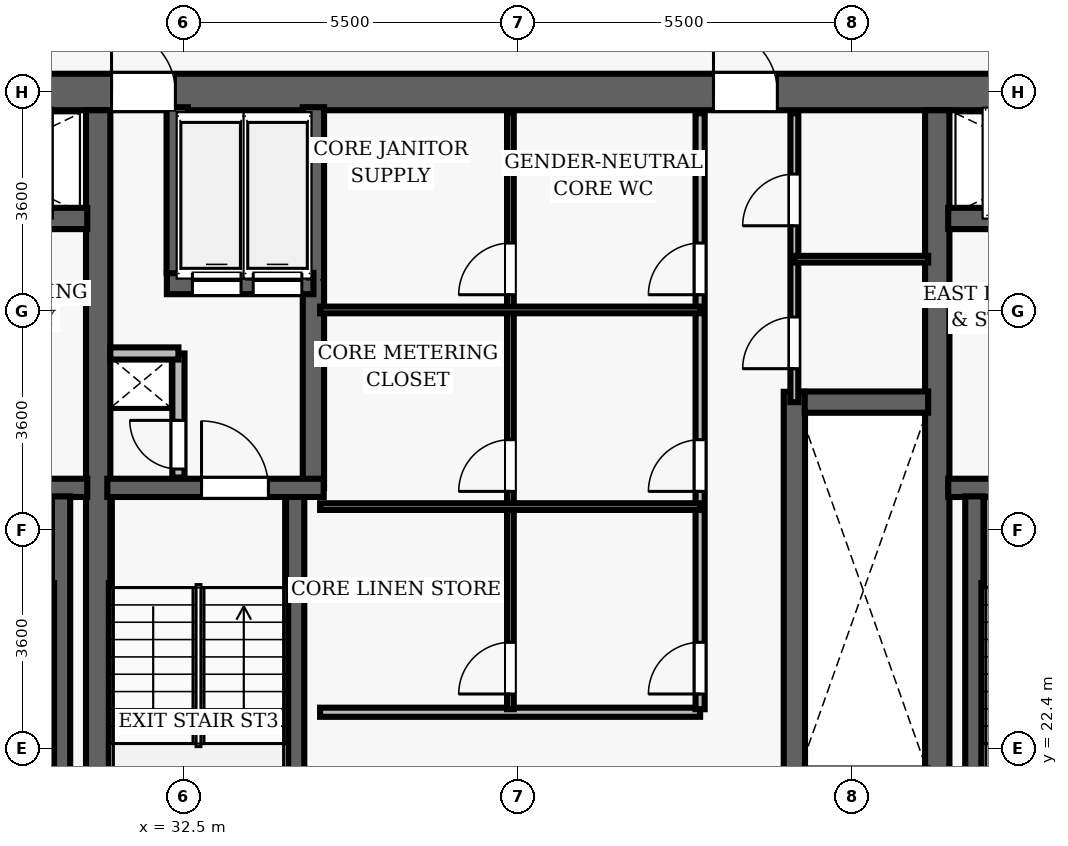
"""IFC4 building model, lengths in metres.
Left out: names, types, materials, properties, quantities, classifications, styles, units other than length and angle.
Written with IfcOpenShell. Run it as: python <this file> out.ifc"""

import sys

from ifc_helpers import new_model, si_unit, direction, frame, frame_2d, origin, place, context, subcontext, project, spatial, rectangle, extrude, element, fill, save


model = new_model("IFC4")
c1 = context("Model", 3, precision=1e-05, world=origin(), true_north=direction((0.0, 1.0)))
c2 = subcontext(c1, "Body", "Model", "MODEL_VIEW")
j1 = project(units=[si_unit("LENGTHUNIT", "METRE"), si_unit("PLANEANGLEUNIT", "RADIAN")], contexts=[c1])
p1 = place(None, origin())
s1 = spatial("IfcSite", under=j1, at=p1, CompositionType="ELEMENT")
p2 = place(p1, origin())
s2 = spatial("IfcBuilding", under=s1, at=p2, CompositionType="ELEMENT")
p3 = place(p2, frame((0.0, 0.0, 113.3)))
s3 = spatial("IfcBuildingStorey", under=s2, at=p3, CompositionType="ELEMENT", Elevation=113.3)
p4 = place(p3, frame((26.7, 33.2, 0.0), z_axis=(0.0, 0.0, 1.0), x_axis=(1.0, 0.0, 0.0)))
e1 = element("IfcWall", 1, at=p4, inside=s3, PredefinedType="SHEAR", context=c2, shape_type="SweptSolid", body=[
    extrude(rectangle(XDim=22.6, YDim=0.6, at=frame_2d((11.3, 0.0))), origin(), (0.0, 0.0, 1.0), 3.5),
])
p5 = place(p4, frame((4.62, 0.0, 0.0)))
e2 = element("IfcOpeningElement", 2, at=p5, cuts=e1, PredefinedType="OPENING", context=c2, shape_type="SweptSolid", body=[
    extrude(rectangle(XDim=1.05, YDim=2.15, at=frame_2d((0.525, 1.075))), frame((0.0, 0.31, 0.0), z_axis=(0.0, -1.0, 0.0), x_axis=(1.0, 0.0, 0.0)), (0.0, 0.0, 1.0), 0.62),
])
p6 = place(p4, frame((14.52, 0.0, 0.0)))
e3 = element("IfcOpeningElement", 3, at=p6, cuts=e1, PredefinedType="OPENING", context=c2, shape_type="SweptSolid", body=[
    extrude(rectangle(XDim=1.05, YDim=2.15, at=frame_2d((0.525, 1.075))), frame((0.0, 0.31, 0.0), z_axis=(0.0, -1.0, 0.0), x_axis=(1.0, 0.0, 0.0)), (0.0, 0.0, 1.0), 0.62),
])
for number, where, z_axis, x_axis in (
    (4, (31.1, 19.1, 0.0), (0.0, 0.0, 1.0), (0.0, 1.0, 0.0)),
    (5, (44.9, 19.1, 0.0), (0.0, 0.0, 1.0), (0.0, 1.0, 0.0)),
):
    element("IfcWall", number, at=place(p3, frame(where, z_axis=z_axis, x_axis=x_axis)), inside=s3, PredefinedType="SHEAR", context=c2, shape_type="SweptSolid", body=[
        extrude(rectangle(XDim=13.8, YDim=0.4, at=frame_2d((6.9, 0.0))), origin(), (0.0, 0.0, 1.0), 3.5),
    ])
p7 = place(p3, frame((27.25, 26.69, 0.0), z_axis=(0.0, 0.0, 1.0), x_axis=(1.0, 0.0, 0.0)))
e6 = element("IfcWall", 6, at=p7, inside=s3, PredefinedType="SHEAR", context=c2, shape_type="SweptSolid", body=[
    extrude(rectangle(XDim=3.67, YDim=0.3, at=frame_2d((1.835, 0.0))), origin(), (0.0, 0.0, 1.0), 3.5),
])
p8 = place(p7, frame((1.05, 0.0, 0.0)))
e7 = element("IfcOpeningElement", 7, at=p8, cuts=e6, PredefinedType="OPENING", context=c2, shape_type="SweptSolid", body=[
    extrude(rectangle(XDim=1.1, YDim=2.15, at=frame_2d((0.55, 1.075))), frame((0.0, 0.16, 0.0), z_axis=(0.0, -1.0, 0.0), x_axis=(1.0, 0.0, 0.0)), (0.0, 0.0, 1.0), 0.32),
])
p9 = place(p3, frame((30.49, 19.05, 0.0), z_axis=(0.0, 0.0, 1.0), x_axis=(0.0, 1.0, 0.0)))
e8 = element("IfcWall", 8, at=p9, inside=s3, PredefinedType="SHEAR", context=c2, shape_type="SweptSolid", body=[
    extrude(rectangle(XDim=7.5, YDim=0.3, at=frame_2d((3.75, 0.0))), origin(), (0.0, 0.0, 1.0), 3.5),
])
p10 = place(p3, frame((27.25, 31.12, 0.0), z_axis=(0.0, 0.0, 1.0), x_axis=(1.0, 0.0, 0.0)))
e9 = element("IfcWall", 9, at=p10, inside=s3, PredefinedType="SHEAR", context=c2, shape_type="SweptSolid", body=[
    extrude(rectangle(XDim=3.67, YDim=0.35, at=frame_2d((1.835, 0.0))), origin(), (0.0, 0.0, 1.0), 2.675),
])
p11 = place(p10, frame((1.25, 0.0, 0.0)))
e10 = element("IfcOpeningElement", 10, at=p11, cuts=e9, PredefinedType="OPENING", context=c2, shape_type="SweptSolid", body=[
    extrude(rectangle(XDim=1.1, YDim=2.15, at=frame_2d((0.55, 1.075))), frame((0.0, 0.185, 0.0), z_axis=(0.0, -1.0, 0.0), x_axis=(1.0, 0.0, 0.0)), (0.0, 0.0, 1.0), 0.37),
])
p12 = place(p3, frame((45.08, 26.69, 0.0), z_axis=(0.0, 0.0, 1.0), x_axis=(1.0, 0.0, 0.0)))
e11 = element("IfcWall", 11, at=p12, inside=s3, PredefinedType="SHEAR", context=c2, shape_type="SweptSolid", body=[
    extrude(rectangle(XDim=3.67, YDim=0.3, at=frame_2d((1.835, 0.0))), origin(), (0.0, 0.0, 1.0), 3.5),
])
p13 = place(p12, frame((1.05, 0.0, 0.0)))
e12 = element("IfcOpeningElement", 12, at=p13, cuts=e11, PredefinedType="OPENING", context=c2, shape_type="SweptSolid", body=[
    extrude(rectangle(XDim=1.1, YDim=2.15, at=frame_2d((0.55, 1.075))), frame((0.0, 0.16, 0.0), z_axis=(0.0, -1.0, 0.0), x_axis=(1.0, 0.0, 0.0)), (0.0, 0.0, 1.0), 0.32),
])
p14 = place(p3, frame((45.51, 19.05, 0.0), z_axis=(0.0, 0.0, 1.0), x_axis=(0.0, 1.0, 0.0)))
e13 = element("IfcWall", 13, at=p14, inside=s3, PredefinedType="SHEAR", context=c2, shape_type="SweptSolid", body=[
    extrude(rectangle(XDim=7.5, YDim=0.3, at=frame_2d((3.75, 0.0))), origin(), (0.0, 0.0, 1.0), 3.5),
])
p15 = place(p3, frame((45.08, 31.12, 0.0), z_axis=(0.0, 0.0, 1.0), x_axis=(1.0, 0.0, 0.0)))
e14 = element("IfcWall", 14, at=p15, inside=s3, PredefinedType="SHEAR", context=c2, shape_type="SweptSolid", body=[
    extrude(rectangle(XDim=3.67, YDim=0.35, at=frame_2d((1.835, 0.0))), origin(), (0.0, 0.0, 1.0), 2.675),
])
p16 = place(p15, frame((1.25, 0.0, 0.0)))
e15 = element("IfcOpeningElement", 15, at=p16, cuts=e14, PredefinedType="OPENING", context=c2, shape_type="SweptSolid", body=[
    extrude(rectangle(XDim=1.1, YDim=2.15, at=frame_2d((0.55, 1.075))), frame((0.0, 0.185, 0.0), z_axis=(0.0, -1.0, 0.0), x_axis=(1.0, 0.0, 0.0)), (0.0, 0.0, 1.0), 0.37),
])
p17 = place(p3, frame((34.34, 19.05, 0.0), z_axis=(0.0, 0.0, 1.0), x_axis=(0.0, 1.0, 0.0)))
e16 = element("IfcWall", 16, at=p17, inside=s3, PredefinedType="SHEAR", context=c2, shape_type="SweptSolid", body=[
    extrude(rectangle(XDim=7.5, YDim=0.3, at=frame_2d((3.75, 0.0))), origin(), (0.0, 0.0, 1.0), 3.5),
])
p18 = place(p3, frame((34.64, 26.69, 0.0), z_axis=(0.0, 0.0, 1.0), x_axis=(0.0, 1.0, 0.0)))
e17 = element("IfcWall", 17, at=p18, inside=s3, PredefinedType="SHEAR", context=c2, shape_type="SweptSolid", body=[
    extrude(rectangle(XDim=6.26, YDim=0.35, at=frame_2d((3.13, 0.0))), origin(), (0.0, 0.0, 1.0), 3.5),
])
p19 = place(p3, frame((31.25, 26.69, 0.0), z_axis=(0.0, 0.0, 1.0), x_axis=(1.0, 0.0, 0.0)))
e18 = element("IfcWall", 18, at=p19, inside=s3, PredefinedType="SHEAR", context=c2, shape_type="SweptSolid", body=[
    extrude(rectangle(XDim=3.56, YDim=0.3, at=frame_2d((1.78, 0.0))), origin(), (0.0, 0.0, 1.0), 3.5),
])
p20 = place(p19, frame((1.55, 0.0, 0.0)))
e19 = element("IfcOpeningElement", 19, at=p20, cuts=e18, PredefinedType="OPENING", context=c2, shape_type="SweptSolid", body=[
    extrude(rectangle(XDim=1.1, YDim=2.15, at=frame_2d((0.55, 1.075))), frame((0.0, 0.16, 0.0), z_axis=(0.0, -1.0, 0.0), x_axis=(1.0, 0.0, 0.0)), (0.0, 0.0, 1.0), 0.32),
])
p21 = place(p3, frame((32.23, 30.05, 0.0), z_axis=(0.0, 0.0, 1.0), x_axis=(1.0, 0.0, 0.0)))
e20 = element("IfcWall", 20, at=p21, inside=s3, PredefinedType="SHEAR", context=c2, shape_type="SweptSolid", body=[
    extrude(rectangle(XDim=2.41, YDim=0.35, at=frame_2d((1.205, 0.0))), origin(), (0.0, 0.0, 1.0), 2.675),
])
p22 = place(p21, frame((0.42, 0.0, 0.0)))
e21 = element("IfcOpeningElement", 21, at=p22, cuts=e20, PredefinedType="OPENING", context=c2, shape_type="SweptSolid", body=[
    extrude(rectangle(XDim=0.8, YDim=2.15, at=frame_2d((0.4, 1.075))), frame((0.0, 0.185, 0.0), z_axis=(0.0, -1.0, 0.0), x_axis=(1.0, 0.0, 0.0)), (0.0, 0.0, 1.0), 0.37),
])
p23 = place(p21, frame((1.42, 0.0, 0.0)))
e22 = element("IfcOpeningElement", 22, at=p23, cuts=e20, PredefinedType="OPENING", context=c2, shape_type="SweptSolid", body=[
    extrude(rectangle(XDim=0.8, YDim=2.15, at=frame_2d((0.4, 1.075))), frame((0.0, 0.185, 0.0), z_axis=(0.0, -1.0, 0.0), x_axis=(1.0, 0.0, 0.0)), (0.0, 0.0, 1.0), 0.37),
])
p24 = place(p3, frame((32.4, 30.22, 0.0), z_axis=(0.0, 0.0, 1.0), x_axis=(0.0, 1.0, 0.0)))
e23 = element("IfcWall", 23, at=p24, inside=s3, PredefinedType="SHEAR", context=c2, shape_type="SweptSolid", body=[
    extrude(rectangle(XDim=2.73, YDim=0.35, at=frame_2d((1.365, 0.0))), origin(), (0.0, 0.0, 1.0), 2.675),
])
p25 = place(p3, frame((32.42, 26.86, 0.0), z_axis=(0.0, 0.0, 1.0), x_axis=(0.0, 1.0, 0.0)))
e24 = element("IfcWall", 24, at=p25, inside=s3, PredefinedType="PARTITIONING", context=c2, shape_type="SweptSolid", body=[
    extrude(rectangle(XDim=2.04, YDim=0.2, at=frame_2d((1.02, 0.0))), origin(), (0.0, 0.0, 1.0), 2.675),
])
p26 = place(p25, frame((0.14, 0.0, 0.0)))
e25 = element("IfcOpeningElement", 25, at=p26, cuts=e24, PredefinedType="OPENING", context=c2, shape_type="SweptSolid", body=[
    extrude(rectangle(XDim=0.8, YDim=2.05, at=frame_2d((0.4, 1.025))), frame((0.0, 0.11, 0.0), z_axis=(0.0, -1.0, 0.0), x_axis=(1.0, 0.0, 0.0)), (0.0, 0.0, 1.0), 0.22),
])
p27 = place(p3, frame((31.3, 28.9, 0.0), z_axis=(0.0, 0.0, 1.0), x_axis=(1.0, 0.0, 0.0)))
e26 = element("IfcWall", 26, at=p27, inside=s3, PredefinedType="PARTITIONING", context=c2, shape_type="SweptSolid", body=[
    extrude(rectangle(XDim=1.12, YDim=0.2, at=frame_2d((0.56, 0.0))), origin(), (0.0, 0.0, 1.0), 2.675),
])
p28 = place(p3, frame((42.55, 21.73, 0.0), z_axis=(0.0, 0.0, 1.0), x_axis=(0.0, 1.0, 0.0)))
e27 = element("IfcWall", 27, at=p28, inside=s3, PredefinedType="SHEAR", context=c2, shape_type="SweptSolid", body=[
    extrude(rectangle(XDim=6.54, YDim=0.35, at=frame_2d((3.27, 0.0))), origin(), (0.0, 0.0, 1.0), 2.675),
])
p29 = place(p3, frame((42.72, 28.1, 0.0), z_axis=(0.0, 0.0, 1.0), x_axis=(1.0, 0.0, 0.0)))
e28 = element("IfcWall", 28, at=p29, inside=s3, PredefinedType="SHEAR", context=c2, shape_type="SweptSolid", body=[
    extrude(rectangle(XDim=2.03, YDim=0.35, at=frame_2d((1.015, 0.0))), origin(), (0.0, 0.0, 1.0), 2.675),
])
p30 = place(p3, frame((34.75, 23.0, 0.0), z_axis=(0.0, 0.0, 1.0), x_axis=(1.0, 0.0, 0.0)))
e29 = element("IfcWall", 29, at=p30, inside=s3, PredefinedType="PARTITIONING", context=c2, shape_type="SweptSolid", body=[
    extrude(rectangle(XDim=6.25, YDim=0.15, at=frame_2d((3.125, 0.0))), origin(), (0.0, 0.0, 1.0), 2.675),
])
p31 = place(p3, frame((41.0, 23.05, 0.0), z_axis=(0.0, 0.0, 1.0), x_axis=(0.0, 1.0, 0.0)))
e30 = element("IfcWall", 30, at=p31, inside=s3, PredefinedType="PARTITIONING", context=c2, shape_type="SweptSolid", body=[
    extrude(rectangle(XDim=9.8, YDim=0.15, at=frame_2d((4.9, 0.0))), origin(), (0.0, 0.0, 1.0), 2.675),
])
p32 = place(p31, frame((0.25, 0.0, 0.0)))
e31 = element("IfcOpeningElement", 31, at=p32, cuts=e30, PredefinedType="OPENING", context=c2, shape_type="SweptSolid", body=[
    extrude(rectangle(XDim=0.85, YDim=2.1, at=frame_2d((0.425, 1.05))), frame((0.0, 0.085, 0.0), z_axis=(0.0, -1.0, 0.0), x_axis=(1.0, 0.0, 0.0)), (0.0, 0.0, 1.0), 0.17),
])
p33 = place(p31, frame((3.582, 0.0, 0.0)))
e32 = element("IfcOpeningElement", 32, at=p33, cuts=e30, PredefinedType="OPENING", context=c2, shape_type="SweptSolid", body=[
    extrude(rectangle(XDim=0.85, YDim=2.1, at=frame_2d((0.425, 1.05))), frame((0.0, 0.085, 0.0), z_axis=(0.0, -1.0, 0.0), x_axis=(1.0, 0.0, 0.0)), (0.0, 0.0, 1.0), 0.17),
])
p34 = place(p31, frame((6.816, 0.0, 0.0)))
e33 = element("IfcOpeningElement", 33, at=p34, cuts=e30, PredefinedType="OPENING", context=c2, shape_type="SweptSolid", body=[
    extrude(rectangle(XDim=0.85, YDim=2.1, at=frame_2d((0.425, 1.05))), frame((0.0, 0.085, 0.0), z_axis=(0.0, -1.0, 0.0), x_axis=(1.0, 0.0, 0.0)), (0.0, 0.0, 1.0), 0.17),
])
p35 = place(p3, frame((37.88, 23.05, 0.0), z_axis=(0.0, 0.0, 1.0), x_axis=(0.0, 1.0, 0.0)))
e34 = element("IfcWall", 34, at=p35, inside=s3, PredefinedType="PARTITIONING", context=c2, shape_type="SweptSolid", body=[
    extrude(rectangle(XDim=9.8, YDim=0.11, at=frame_2d((4.9, 0.0))), origin(), (0.0, 0.0, 1.0), 2.675),
])
p36 = place(p35, frame((0.25, 0.0, 0.0)))
e35 = element("IfcOpeningElement", 35, at=p36, cuts=e34, PredefinedType="OPENING", context=c2, shape_type="SweptSolid", body=[
    extrude(rectangle(XDim=0.85, YDim=2.1, at=frame_2d((0.425, 1.05))), frame((0.0, 0.065, 0.0), z_axis=(0.0, -1.0, 0.0), x_axis=(1.0, 0.0, 0.0)), (0.0, 0.0, 1.0), 0.13),
])
p37 = place(p35, frame((3.582, 0.0, 0.0)))
e36 = element("IfcOpeningElement", 36, at=p37, cuts=e34, PredefinedType="OPENING", context=c2, shape_type="SweptSolid", body=[
    extrude(rectangle(XDim=0.85, YDim=2.1, at=frame_2d((0.425, 1.05))), frame((0.0, 0.065, 0.0), z_axis=(0.0, -1.0, 0.0), x_axis=(1.0, 0.0, 0.0)), (0.0, 0.0, 1.0), 0.13),
])
p38 = place(p35, frame((6.816, 0.0, 0.0)))
e37 = element("IfcOpeningElement", 37, at=p38, cuts=e34, PredefinedType="OPENING", context=c2, shape_type="SweptSolid", body=[
    extrude(rectangle(XDim=0.85, YDim=2.1, at=frame_2d((0.425, 1.05))), frame((0.0, 0.065, 0.0), z_axis=(0.0, -1.0, 0.0), x_axis=(1.0, 0.0, 0.0)), (0.0, 0.0, 1.0), 0.13),
])
for number, where, z_axis, x_axis in (
    (38, (34.75, 26.382, 0.0), (0.0, 0.0, 1.0), (1.0, 0.0, 0.0)),
    (39, (34.75, 29.616, 0.0), (0.0, 0.0, 1.0), (1.0, 0.0, 0.0)),
):
    element("IfcWall", number, at=place(p3, frame(where, z_axis=z_axis, x_axis=x_axis)), inside=s3, PredefinedType="PARTITIONING", context=c2, shape_type="SweptSolid", body=[
        extrude(rectangle(XDim=6.25, YDim=0.11, at=frame_2d((3.125, 0.0))), origin(), (0.0, 0.0, 1.0), 2.675),
    ])
p39 = place(p3, frame((42.55, 28.1, 0.0), z_axis=(0.0, 0.0, 1.0), x_axis=(0.0, 1.0, 0.0)))
e40 = element("IfcWall", 40, at=p39, inside=s3, PredefinedType="PARTITIONING", context=c2, shape_type="SweptSolid", body=[
    extrude(rectangle(XDim=4.75, YDim=0.13, at=frame_2d((2.375, 0.0))), origin(), (0.0, 0.0, 1.0), 2.675),
])
p40 = place(p39, frame((0.55, 0.0, 0.0)))
e41 = element("IfcOpeningElement", 41, at=p40, cuts=e40, PredefinedType="OPENING", context=c2, shape_type="SweptSolid", body=[
    extrude(rectangle(XDim=0.85, YDim=2.1, at=frame_2d((0.425, 1.05))), frame((0.0, 0.075, 0.0), z_axis=(0.0, -1.0, 0.0), x_axis=(1.0, 0.0, 0.0)), (0.0, 0.0, 1.0), 0.15),
])
p41 = place(p39, frame((2.9, 0.0, 0.0)))
e42 = element("IfcOpeningElement", 42, at=p41, cuts=e40, PredefinedType="OPENING", context=c2, shape_type="SweptSolid", body=[
    extrude(rectangle(XDim=0.85, YDim=2.1, at=frame_2d((0.425, 1.05))), frame((0.0, 0.075, 0.0), z_axis=(0.0, -1.0, 0.0), x_axis=(1.0, 0.0, 0.0)), (0.0, 0.0, 1.0), 0.15),
])
p42 = place(p3, frame((42.55, 30.45, 0.0), z_axis=(0.0, 0.0, 1.0), x_axis=(1.0, 0.0, 0.0)))
e43 = element("IfcWall", 43, at=p42, inside=s3, PredefinedType="PARTITIONING", context=c2, shape_type="SweptSolid", body=[
    extrude(rectangle(XDim=2.2, YDim=0.11, at=frame_2d((1.1, 0.0))), origin(), (0.0, 0.0, 1.0), 2.675),
])
p43 = place(p20, origin())
e44 = element("IfcDoor", 44, at=p43, inside=s3, OperationType="SINGLE_SWING_LEFT", PredefinedType="DOOR", context=c2, shape_type="SweptSolid", body=[
    extrude(rectangle(XDim=1.1, YDim=2.15, at=frame_2d((0.55, 1.075))), frame((0.0, 0.025, 0.0), z_axis=(0.0, -1.0, 0.0), x_axis=(1.0, 0.0, 0.0)), (0.0, 0.0, 1.0), 0.05),
])
fill(e19, e44)
p44 = place(p26, origin())
e45 = element("IfcDoor", 45, at=p44, inside=s3, OperationType="SINGLE_SWING_RIGHT", PredefinedType="DOOR", context=c2, shape_type="SweptSolid", body=[
    extrude(rectangle(XDim=0.8, YDim=2.05, at=frame_2d((0.4, 1.025))), frame((0.0, 0.025, 0.0), z_axis=(0.0, -1.0, 0.0), x_axis=(1.0, 0.0, 0.0)), (0.0, 0.0, 1.0), 0.05),
])
fill(e25, e45)
p45 = place(p5, origin())
e46 = element("IfcDoor", 46, at=p45, inside=s3, OperationType="SINGLE_SWING_LEFT", PredefinedType="DOOR", context=c2, shape_type="SweptSolid", body=[
    extrude(rectangle(XDim=1.05, YDim=2.15, at=frame_2d((0.525, 1.075))), frame((0.0, 0.025, 0.0), z_axis=(0.0, -1.0, 0.0), x_axis=(1.0, 0.0, 0.0)), (0.0, 0.0, 1.0), 0.05),
])
fill(e2, e46)
p46 = place(p6, origin())
e47 = element("IfcDoor", 47, at=p46, inside=s3, OperationType="SINGLE_SWING_LEFT", PredefinedType="DOOR", context=c2, shape_type="SweptSolid", body=[
    extrude(rectangle(XDim=1.05, YDim=2.15, at=frame_2d((0.525, 1.075))), frame((0.0, 0.025, 0.0), z_axis=(0.0, -1.0, 0.0), x_axis=(1.0, 0.0, 0.0)), (0.0, 0.0, 1.0), 0.05),
])
fill(e3, e47)
p47 = place(p32, origin())
e48 = element("IfcDoor", 48, at=p47, inside=s3, OperationType="SINGLE_SWING_LEFT", PredefinedType="DOOR", context=c2, shape_type="SweptSolid", body=[
    extrude(rectangle(XDim=0.85, YDim=2.1, at=frame_2d((0.425, 1.05))), frame((0.0, 0.025, 0.0), z_axis=(0.0, -1.0, 0.0), x_axis=(1.0, 0.0, 0.0)), (0.0, 0.0, 1.0), 0.05),
])
fill(e31, e48)
p48 = place(p36, origin())
e49 = element("IfcDoor", 49, at=p48, inside=s3, OperationType="SINGLE_SWING_LEFT", PredefinedType="DOOR", context=c2, shape_type="SweptSolid", body=[
    extrude(rectangle(XDim=0.85, YDim=2.1, at=frame_2d((0.425, 1.05))), frame((0.0, 0.025, 0.0), z_axis=(0.0, -1.0, 0.0), x_axis=(1.0, 0.0, 0.0)), (0.0, 0.0, 1.0), 0.05),
])
fill(e35, e49)
p49 = place(p33, origin())
e50 = element("IfcDoor", 50, at=p49, inside=s3, OperationType="SINGLE_SWING_LEFT", PredefinedType="DOOR", context=c2, shape_type="SweptSolid", body=[
    extrude(rectangle(XDim=0.85, YDim=2.1, at=frame_2d((0.425, 1.05))), frame((0.0, 0.025, 0.0), z_axis=(0.0, -1.0, 0.0), x_axis=(1.0, 0.0, 0.0)), (0.0, 0.0, 1.0), 0.05),
])
fill(e32, e50)
p50 = place(p37, origin())
e51 = element("IfcDoor", 51, at=p50, inside=s3, OperationType="SINGLE_SWING_LEFT", PredefinedType="DOOR", context=c2, shape_type="SweptSolid", body=[
    extrude(rectangle(XDim=0.85, YDim=2.1, at=frame_2d((0.425, 1.05))), frame((0.0, 0.025, 0.0), z_axis=(0.0, -1.0, 0.0), x_axis=(1.0, 0.0, 0.0)), (0.0, 0.0, 1.0), 0.05),
])
fill(e36, e51)
p51 = place(p34, origin())
e52 = element("IfcDoor", 52, at=p51, inside=s3, OperationType="SINGLE_SWING_LEFT", PredefinedType="DOOR", context=c2, shape_type="SweptSolid", body=[
    extrude(rectangle(XDim=0.85, YDim=2.1, at=frame_2d((0.425, 1.05))), frame((0.0, 0.025, 0.0), z_axis=(0.0, -1.0, 0.0), x_axis=(1.0, 0.0, 0.0)), (0.0, 0.0, 1.0), 0.05),
])
fill(e33, e52)
p52 = place(p38, origin())
e53 = element("IfcDoor", 53, at=p52, inside=s3, OperationType="SINGLE_SWING_LEFT", PredefinedType="DOOR", context=c2, shape_type="SweptSolid", body=[
    extrude(rectangle(XDim=0.85, YDim=2.1, at=frame_2d((0.425, 1.05))), frame((0.0, 0.025, 0.0), z_axis=(0.0, -1.0, 0.0), x_axis=(1.0, 0.0, 0.0)), (0.0, 0.0, 1.0), 0.05),
])
fill(e37, e53)
p53 = place(p40, origin())
e54 = element("IfcDoor", 54, at=p53, inside=s3, OperationType="SINGLE_SWING_LEFT", PredefinedType="DOOR", context=c2, shape_type="SweptSolid", body=[
    extrude(rectangle(XDim=0.85, YDim=2.1, at=frame_2d((0.425, 1.05))), frame((0.0, 0.025, 0.0), z_axis=(0.0, -1.0, 0.0), x_axis=(1.0, 0.0, 0.0)), (0.0, 0.0, 1.0), 0.05),
])
fill(e41, e54)
p54 = place(p41, origin())
e55 = element("IfcDoor", 55, at=p54, inside=s3, OperationType="SINGLE_SWING_LEFT", PredefinedType="DOOR", context=c2, shape_type="SweptSolid", body=[
    extrude(rectangle(XDim=0.85, YDim=2.1, at=frame_2d((0.425, 1.05))), frame((0.0, 0.025, 0.0), z_axis=(0.0, -1.0, 0.0), x_axis=(1.0, 0.0, 0.0)), (0.0, 0.0, 1.0), 0.05),
])
fill(e42, e55)
p55 = place(p22, origin())
e56 = element("IfcDoor", 56, at=p55, inside=s3, OperationType="SLIDING_TO_LEFT", PredefinedType="DOOR", context=c2, shape_type="SweptSolid", body=[
    extrude(rectangle(XDim=0.8, YDim=2.15, at=frame_2d((0.4, 1.075))), frame((0.0, 0.025, 0.0), z_axis=(0.0, -1.0, 0.0), x_axis=(1.0, 0.0, 0.0)), (0.0, 0.0, 1.0), 0.05),
])
fill(e21, e56)
p56 = place(p23, origin())
e57 = element("IfcDoor", 57, at=p56, inside=s3, OperationType="SLIDING_TO_LEFT", PredefinedType="DOOR", context=c2, shape_type="SweptSolid", body=[
    extrude(rectangle(XDim=0.8, YDim=2.15, at=frame_2d((0.4, 1.075))), frame((0.0, 0.025, 0.0), z_axis=(0.0, -1.0, 0.0), x_axis=(1.0, 0.0, 0.0)), (0.0, 0.0, 1.0), 0.05),
])
fill(e22, e57)
save(model, sys.argv[1])
